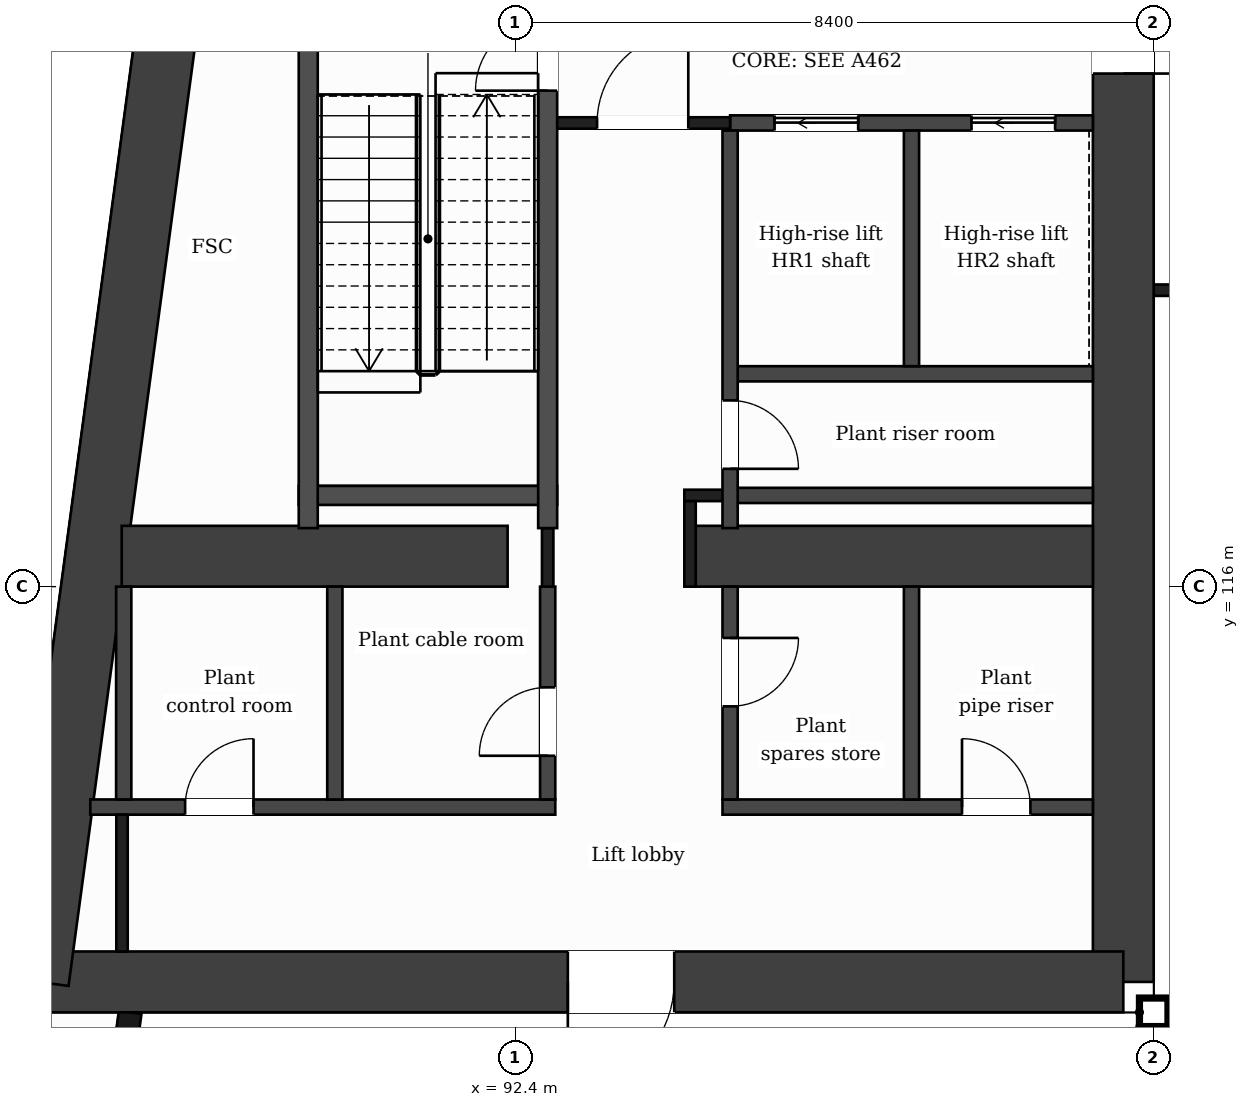
"""IFC4 building model, lengths in metres.
Left out: names, types, materials, properties, quantities, classifications, styles, units other than length and angle.
Written with IfcOpenShell. Run it as: python <this file> out.ifc"""

import sys

from ifc_helpers import new_model, si_unit, direction, frame, frame_2d, origin, place, context, subcontext, project, spatial, rectangle, extrude, element, fill, save


model = new_model("IFC4")
c1 = context("Model", 3, precision=1e-05, world=origin(), true_north=direction((0.0, 1.0)))
c2 = subcontext(c1, "Body", "Model", "MODEL_VIEW")
j1 = project(units=[si_unit("LENGTHUNIT", "METRE"), si_unit("PLANEANGLEUNIT", "RADIAN")], contexts=[c1])
p1 = place(None, origin())
s1 = spatial("IfcSite", under=j1, at=p1, CompositionType="ELEMENT")
p2 = place(p1, origin())
s2 = spatial("IfcBuilding", under=s1, at=p2, CompositionType="ELEMENT")
p3 = place(p2, frame((0.0, 0.0, 254.0)))
s3 = spatial("IfcBuildingStorey", under=s2, at=p3, CompositionType="ELEMENT", Elevation=254.0)
p4 = place(p3, frame((100.4, 132.0, 0.0), z_axis=(0.0, 0.0, 1.0), x_axis=(0.0, -1.0, 0.0)))
e1 = element("IfcWall", 1, at=p4, inside=s3, PredefinedType="SHEAR", context=c2, shape_type="SweptSolid", body=[
    extrude(rectangle(XDim=21.2, YDim=0.8, at=frame_2d((10.6, 0.0))), origin(), (0.0, 0.0, 1.0), 5.0),
])
p5 = place(p4, frame((2.4, 0.0, 0.0)))
e2 = element("IfcOpeningElement", 2, at=p5, cuts=e1, PredefinedType="OPENING", context=c2, shape_type="SweptSolid", body=[
    extrude(rectangle(XDim=1.2, YDim=2.1, at=frame_2d((0.6, 1.05))), frame((0.0, 0.41, 0.0), z_axis=(0.0, -1.0, 0.0), x_axis=(1.0, 0.0, 0.0)), (0.0, 0.0, 1.0), 0.82),
])
p6 = place(p4, frame((7.85, 0.0, 0.0)))
e3 = element("IfcOpeningElement", 3, at=p6, cuts=e1, PredefinedType="OPENING", context=c2, shape_type="SweptSolid", body=[
    extrude(rectangle(XDim=1.4, YDim=2.1, at=frame_2d((0.7, 1.05))), frame((0.0, 0.41, 0.0), z_axis=(0.0, -1.0, 0.0), x_axis=(1.0, 0.0, 0.0)), (0.0, 0.0, 1.0), 0.82),
])
p7 = place(p3, frame((100.4, 110.8, 0.0), z_axis=(0.0, 0.0, 1.0), x_axis=(-1.0, 0.0, 0.0)))
e4 = element("IfcWall", 4, at=p7, inside=s3, PredefinedType="SHEAR", context=c2, shape_type="SweptSolid", body=[
    extrude(rectangle(XDim=14.273, YDim=0.8, at=frame_2d((7.137, 0.0))), origin(), (0.0, 0.0, 1.0), 5.0),
])
p8 = place(p7, frame((5.908, 0.0, 0.0)))
e5 = element("IfcOpeningElement", 5, at=p8, cuts=e4, PredefinedType="OPENING", context=c2, shape_type="SweptSolid", body=[
    extrude(rectangle(XDim=1.4, YDim=2.1, at=frame_2d((0.7, 1.05))), frame((0.0, 0.41, 0.0), z_axis=(0.0, -1.0, 0.0), x_axis=(1.0, 0.0, 0.0)), (0.0, 0.0, 1.0), 0.82),
])
p9 = place(p3, frame((86.127, 110.8, 0.0), z_axis=(0.0, 0.0, 1.0), x_axis=(0.133408347329, 0.991061154956, 0.0)))
e6 = element("IfcWall", 6, at=p9, inside=s3, PredefinedType="SHEAR", context=c2, shape_type="SweptSolid", body=[
    extrude(rectangle(XDim=21.391, YDim=0.8, at=frame_2d((10.696, 0.0))), origin(), (0.0, 0.0, 1.0), 5.0),
])
p10 = place(p3, frame((87.223, 116.4, 0.0), z_axis=(0.0, 0.0, 1.0), x_axis=(1.0, 0.0, 0.0)))
e7 = element("IfcWall", 7, at=p10, inside=s3, PredefinedType="SHEAR", context=c2, shape_type="SweptSolid", body=[
    extrude(rectangle(XDim=5.077, YDim=0.8, at=frame_2d((2.539, 0.0))), origin(), (0.0, 0.0, 1.0), 5.0),
])
p11 = place(p3, frame((94.7, 116.4, 0.0), z_axis=(0.0, 0.0, 1.0), x_axis=(1.0, 0.0, 0.0)))
e8 = element("IfcWall", 8, at=p11, inside=s3, PredefinedType="SHEAR", context=c2, shape_type="SweptSolid", body=[
    extrude(rectangle(XDim=5.3, YDim=0.8, at=frame_2d((2.65, 0.0))), origin(), (0.0, 0.0, 1.0), 5.0),
])
p12 = place(p3, frame((87.334, 110.4, 0.0), z_axis=(0.0, 0.0, 1.0), x_axis=(-0.133437175554, -0.991057273915, 0.0)))
e9 = element("IfcWall", 9, at=p12, inside=s3, PredefinedType="SOLIDWALL", context=c2, shape_type="SweptSolid", body=[
    extrude(rectangle(XDim=6.781, YDim=0.3, at=frame_2d((3.39, 0.0))), origin(), (0.0, 0.0, 1.0), 4.68),
])
p13 = place(p12, frame((1.418, 0.0, 0.0)))
e10 = element("IfcOpeningElement", 10, at=p13, cuts=e9, PredefinedType="OPENING", context=c2, shape_type="SweptSolid", body=[
    extrude(rectangle(XDim=1.2, YDim=2.4, at=frame_2d((0.6, 1.2))), frame((0.0, 0.16, 0.0), z_axis=(0.0, -1.0, 0.0), x_axis=(1.0, 0.0, 0.0)), (0.0, 0.0, 1.0), 0.32),
])
p14 = place(p3, frame((100.7, 110.4, 0.0), z_axis=(0.0, 0.0, 1.0), x_axis=(1.0, 0.0, 0.0)))
e11 = element("IfcWall", 11, at=p14, inside=s3, PredefinedType="PARTITIONING", context=c2, shape_type="SweptSolid", body=[
    extrude(rectangle(XDim=25.4, YDim=0.2, at=frame_2d((12.7, 0.0))), origin(), (0.0, 0.0, 1.0), 4.68),
])
p15 = place(p14, frame((3.7, 0.0, 0.0)))
e12 = element("IfcOpeningElement", 12, at=p15, cuts=e11, PredefinedType="OPENING", context=c2, shape_type="SweptSolid", body=[
    extrude(rectangle(XDim=1.2, YDim=2.1, at=frame_2d((0.6, 1.05))), frame((0.0, 0.11, 0.0), z_axis=(0.0, -1.0, 0.0), x_axis=(1.0, 0.0, 0.0)), (0.0, 0.0, 1.0), 0.22),
])
p16 = place(p3, frame((86.81, 113.1, 0.0), z_axis=(0.0, 0.0, 1.0), x_axis=(1.0, 0.0, 0.0)))
e13 = element("IfcWall", 13, at=p16, inside=s3, PredefinedType="PARTITIONING", context=c2, shape_type="SweptSolid", body=[
    extrude(rectangle(XDim=6.117, YDim=0.2, at=frame_2d((3.059, 0.0))), origin(), (0.0, 0.0, 1.0), 4.68),
])
p17 = place(p16, frame((1.247, 0.0, 0.0)))
e14 = element("IfcOpeningElement", 14, at=p17, cuts=e13, PredefinedType="OPENING", context=c2, shape_type="SweptSolid", body=[
    extrude(rectangle(XDim=0.9, YDim=2.1, at=frame_2d((0.45, 1.05))), frame((0.0, 0.11, 0.0), z_axis=(0.0, -1.0, 0.0), x_axis=(1.0, 0.0, 0.0)), (0.0, 0.0, 1.0), 0.22),
])
p18 = place(p3, frame((95.127, 113.1, 0.0), z_axis=(0.0, 0.0, 1.0), x_axis=(1.0, 0.0, 0.0)))
e15 = element("IfcWall", 15, at=p18, inside=s3, PredefinedType="PARTITIONING", context=c2, shape_type="SweptSolid", body=[
    extrude(rectangle(XDim=4.873, YDim=0.2, at=frame_2d((2.437, 0.0))), origin(), (0.0, 0.0, 1.0), 4.68),
])
p19 = place(p18, frame((3.151, 0.0, 0.0)))
e16 = element("IfcOpeningElement", 16, at=p19, cuts=e15, PredefinedType="OPENING", context=c2, shape_type="SweptSolid", body=[
    extrude(rectangle(XDim=0.9, YDim=2.1, at=frame_2d((0.45, 1.05))), frame((0.0, 0.11, 0.0), z_axis=(0.0, -1.0, 0.0), x_axis=(1.0, 0.0, 0.0)), (0.0, 0.0, 1.0), 0.22),
])
p20 = place(p3, frame((95.227, 117.2, 0.0), z_axis=(0.0, 0.0, 1.0), x_axis=(1.0, 0.0, 0.0)))
e17 = element("IfcWall", 17, at=p20, inside=s3, PredefinedType="PARTITIONING", context=c2, shape_type="SweptSolid", body=[
    extrude(rectangle(XDim=4.773, YDim=0.2, at=frame_2d((2.386, 0.0))), origin(), (0.0, 0.0, 1.0), 4.68),
])
p21 = place(p3, frame((94.625, 117.2, 0.0), z_axis=(0.0, 0.0, 1.0), x_axis=(1.0, 0.0, 0.0)))
e18 = element("IfcWall", 18, at=p21, inside=s3, PredefinedType="PARTITIONING", context=c2, shape_type="SweptSolid", body=[
    extrude(rectangle(XDim=0.602, YDim=0.15, at=frame_2d((0.301, 0.0))), origin(), (0.0, 0.0, 1.0), 4.68),
])
p22 = place(p3, frame((89.552, 117.2, 0.0), z_axis=(0.0, 0.0, 1.0), x_axis=(1.0, 0.0, 0.0)))
e19 = element("IfcWall", 19, at=p22, inside=s3, PredefinedType="PARTITIONING", context=c2, shape_type="SweptSolid", body=[
    extrude(rectangle(XDim=3.4, YDim=0.25, at=frame_2d((1.7, 0.0))), origin(), (0.0, 0.0, 1.0), 4.68),
])
p23 = place(p3, frame((95.227, 118.8, 0.0), z_axis=(0.0, 0.0, 1.0), x_axis=(1.0, 0.0, 0.0)))
e20 = element("IfcWall", 20, at=p23, inside=s3, PredefinedType="PARTITIONING", context=c2, shape_type="SweptSolid", body=[
    extrude(rectangle(XDim=4.773, YDim=0.2, at=frame_2d((2.386, 0.0))), origin(), (0.0, 0.0, 1.0), 4.68),
])
p24 = place(p3, frame((100.8, 119.9, 0.0), z_axis=(0.0, 0.0, 1.0), x_axis=(1.0, 0.0, 0.0)))
e21 = element("IfcWall", 21, at=p24, inside=s3, PredefinedType="PARTITIONING", context=c2, shape_type="SweptSolid", body=[
    extrude(rectangle(XDim=25.2, YDim=0.15, at=frame_2d((12.6, 0.0))), origin(), (0.0, 0.0, 1.0), 4.68),
])
p25 = place(p24, frame((3.6, 0.0, 0.0)))
e22 = element("IfcOpeningElement", 22, at=p25, cuts=e21, PredefinedType="OPENING", context=c2, shape_type="SweptSolid", body=[
    extrude(rectangle(XDim=1.2, YDim=2.1, at=frame_2d((0.6, 1.05))), frame((0.0, 0.085, 0.0), z_axis=(0.0, -1.0, 0.0), x_axis=(1.0, 0.0, 0.0)), (0.0, 0.0, 1.0), 0.17),
])
p26 = place(p24, frame((12.0, 0.0, 0.0)))
e23 = element("IfcOpeningElement", 23, at=p26, cuts=e21, PredefinedType="OPENING", context=c2, shape_type="SweptSolid", body=[
    extrude(rectangle(XDim=1.2, YDim=2.1, at=frame_2d((0.6, 1.05))), frame((0.0, 0.085, 0.0), z_axis=(0.0, -1.0, 0.0), x_axis=(1.0, 0.0, 0.0)), (0.0, 0.0, 1.0), 0.17),
])
p27 = place(p24, frame((20.4, 0.0, 0.0)))
e24 = element("IfcOpeningElement", 24, at=p27, cuts=e21, PredefinedType="OPENING", context=c2, shape_type="SweptSolid", body=[
    extrude(rectangle(XDim=1.2, YDim=2.1, at=frame_2d((0.6, 1.05))), frame((0.0, 0.085, 0.0), z_axis=(0.0, -1.0, 0.0), x_axis=(1.0, 0.0, 0.0)), (0.0, 0.0, 1.0), 0.17),
])
p28 = place(p3, frame((95.227, 122.1, 0.0), z_axis=(0.0, 0.0, 1.0), x_axis=(1.0, 0.0, 0.0)))
e25 = element("IfcWall", 25, at=p28, inside=s3, PredefinedType="PARTITIONING", context=c2, shape_type="SweptSolid", body=[
    extrude(rectangle(XDim=4.773, YDim=0.2, at=frame_2d((2.386, 0.0))), origin(), (0.0, 0.0, 1.0), 4.68),
])
p29 = place(p28, frame((0.585, 0.0, 0.0)))
e26 = element("IfcOpeningElement", 26, at=p29, cuts=e25, PredefinedType="OPENING", context=c2, shape_type="SweptSolid", body=[
    extrude(rectangle(XDim=1.1, YDim=2.1, at=frame_2d((0.55, 1.05))), frame((0.0, 0.11, 0.0), z_axis=(0.0, -1.0, 0.0), x_axis=(1.0, 0.0, 0.0)), (0.0, 0.0, 1.0), 0.22),
])
p30 = place(p28, frame((3.176, 0.0, 0.0)))
e27 = element("IfcOpeningElement", 27, at=p30, cuts=e25, PredefinedType="OPENING", context=c2, shape_type="SweptSolid", body=[
    extrude(rectangle(XDim=1.1, YDim=2.1, at=frame_2d((0.55, 1.05))), frame((0.0, 0.11, 0.0), z_axis=(0.0, -1.0, 0.0), x_axis=(1.0, 0.0, 0.0)), (0.0, 0.0, 1.0), 0.22),
])
p31 = place(p3, frame((92.827, 122.1, 0.0), z_axis=(0.0, 0.0, 1.0), x_axis=(1.0, 0.0, 0.0)))
e28 = element("IfcWall", 28, at=p31, inside=s3, PredefinedType="PARTITIONING", context=c2, shape_type="SweptSolid", body=[
    extrude(rectangle(XDim=2.4, YDim=0.15, at=frame_2d((1.2, 0.0))), origin(), (0.0, 0.0, 1.0), 4.68),
])
p32 = place(p31, frame((0.65, 0.0, 0.0)))
e29 = element("IfcOpeningElement", 29, at=p32, cuts=e28, PredefinedType="OPENING", context=c2, shape_type="SweptSolid", body=[
    extrude(rectangle(XDim=1.2, YDim=2.1, at=frame_2d((0.6, 1.05))), frame((0.0, 0.085, 0.0), z_axis=(0.0, -1.0, 0.0), x_axis=(1.0, 0.0, 0.0)), (0.0, 0.0, 1.0), 0.17),
])
p33 = place(p3, frame((87.25, 113.2, 0.0), z_axis=(0.0, 0.0, 1.0), x_axis=(0.0, 1.0, 0.0)))
e30 = element("IfcWall", 30, at=p33, inside=s3, PredefinedType="PARTITIONING", context=c2, shape_type="SweptSolid", body=[
    extrude(rectangle(XDim=2.8, YDim=0.2, at=frame_2d((1.4, 0.0))), origin(), (0.0, 0.0, 1.0), 4.68),
])
p34 = place(p3, frame((87.227, 111.2, 0.0), z_axis=(0.0, 0.0, 1.0), x_axis=(0.0, 1.0, 0.0)))
e31 = element("IfcWall", 31, at=p34, inside=s3, PredefinedType="PARTITIONING", context=c2, shape_type="SweptSolid", body=[
    extrude(rectangle(XDim=1.8, YDim=0.15, at=frame_2d((0.9, 0.0))), origin(), (0.0, 0.0, 1.0), 4.68),
])
p35 = place(p3, frame((89.677, 116.77, 0.0), z_axis=(0.0, 0.0, 1.0), x_axis=(0.0, 1.0, 0.0)))
e32 = element("IfcWall", 32, at=p35, inside=s3, PredefinedType="PARTITIONING", context=c2, shape_type="SweptSolid", body=[
    extrude(rectangle(XDim=7.055, YDim=0.25, at=frame_2d((3.527, 0.0))), origin(), (0.0, 0.0, 1.0), 4.68),
])
p36 = place(p3, frame((90.027, 113.2, 0.0), z_axis=(0.0, 0.0, 1.0), x_axis=(0.0, 1.0, 0.0)))
e33 = element("IfcWall", 33, at=p36, inside=s3, PredefinedType="PARTITIONING", context=c2, shape_type="SweptSolid", body=[
    extrude(rectangle(XDim=2.8, YDim=0.2, at=frame_2d((1.4, 0.0))), origin(), (0.0, 0.0, 1.0), 4.68),
])
p37 = place(p3, frame((92.827, 113.2, 0.0), z_axis=(0.0, 0.0, 1.0), x_axis=(0.0, 1.0, 0.0)))
e34 = element("IfcWall", 34, at=p37, inside=s3, PredefinedType="PARTITIONING", context=c2, shape_type="SweptSolid", body=[
    extrude(rectangle(XDim=2.8, YDim=0.2, at=frame_2d((1.4, 0.0))), origin(), (0.0, 0.0, 1.0), 4.68),
])
p38 = place(p37, frame((0.575, 0.0, 0.0)))
e35 = element("IfcOpeningElement", 35, at=p38, cuts=e34, PredefinedType="OPENING", context=c2, shape_type="SweptSolid", body=[
    extrude(rectangle(XDim=0.9, YDim=2.1, at=frame_2d((0.45, 1.05))), frame((0.0, 0.11, 0.0), z_axis=(0.0, -1.0, 0.0), x_axis=(1.0, 0.0, 0.0)), (0.0, 0.0, 1.0), 0.22),
])
p39 = place(p3, frame((92.827, 116.0, 0.0), z_axis=(0.0, 0.0, 1.0), x_axis=(0.0, 1.0, 0.0)))
e36 = element("IfcWall", 36, at=p39, inside=s3, PredefinedType="PARTITIONING", context=c2, shape_type="SweptSolid", body=[
    extrude(rectangle(XDim=0.77, YDim=0.15, at=frame_2d((0.385, 0.0))), origin(), (0.0, 0.0, 1.0), 4.68),
])
p40 = place(p3, frame((92.827, 116.77, 0.0), z_axis=(0.0, 0.0, 1.0), x_axis=(0.0, 1.0, 0.0)))
e37 = element("IfcWall", 37, at=p40, inside=s3, PredefinedType="PARTITIONING", context=c2, shape_type="SweptSolid", body=[
    extrude(rectangle(XDim=7.055, YDim=0.25, at=frame_2d((3.527, 0.0))), origin(), (0.0, 0.0, 1.0), 4.68),
])
p41 = place(p40, frame((5.755, 0.0, 0.0)))
e38 = element("IfcOpeningElement", 38, at=p41, cuts=e37, PredefinedType="OPENING", context=c2, shape_type="SweptSolid", body=[
    extrude(rectangle(XDim=0.95, YDim=2.1, at=frame_2d((0.475, 1.05))), frame((0.0, 0.135, 0.0), z_axis=(0.0, -1.0, 0.0), x_axis=(1.0, 0.0, 0.0)), (0.0, 0.0, 1.0), 0.27),
])
p42 = place(p3, frame((94.7, 116.0, 0.0), z_axis=(0.0, 0.0, 1.0), x_axis=(0.0, 1.0, 0.0)))
e39 = element("IfcWall", 39, at=p42, inside=s3, PredefinedType="PARTITIONING", context=c2, shape_type="SweptSolid", body=[
    extrude(rectangle(XDim=1.125, YDim=0.15, at=frame_2d((0.562, 0.0))), origin(), (0.0, 0.0, 1.0), 4.68),
])
p43 = place(p3, frame((95.227, 113.2, 0.0), z_axis=(0.0, 0.0, 1.0), x_axis=(0.0, 1.0, 0.0)))
e40 = element("IfcWall", 40, at=p43, inside=s3, PredefinedType="PARTITIONING", context=c2, shape_type="SweptSolid", body=[
    extrude(rectangle(XDim=2.8, YDim=0.2, at=frame_2d((1.4, 0.0))), origin(), (0.0, 0.0, 1.0), 4.68),
])
p44 = place(p43, frame((1.225, 0.0, 0.0)))
e41 = element("IfcOpeningElement", 41, at=p44, cuts=e40, PredefinedType="OPENING", context=c2, shape_type="SweptSolid", body=[
    extrude(rectangle(XDim=0.9, YDim=2.1, at=frame_2d((0.45, 1.05))), frame((0.0, 0.11, 0.0), z_axis=(0.0, -1.0, 0.0), x_axis=(1.0, 0.0, 0.0)), (0.0, 0.0, 1.0), 0.22),
])
p45 = place(p3, frame((95.227, 116.77, 0.0), z_axis=(0.0, 0.0, 1.0), x_axis=(0.0, 1.0, 0.0)))
e42 = element("IfcWall", 42, at=p45, inside=s3, PredefinedType="PARTITIONING", context=c2, shape_type="SweptSolid", body=[
    extrude(rectangle(XDim=5.23, YDim=0.2, at=frame_2d((2.615, 0.0))), origin(), (0.0, 0.0, 1.0), 4.68),
])
p46 = place(p45, frame((0.78, 0.0, 0.0)))
e43 = element("IfcOpeningElement", 43, at=p46, cuts=e42, PredefinedType="OPENING", context=c2, shape_type="SweptSolid", body=[
    extrude(rectangle(XDim=0.9, YDim=2.1, at=frame_2d((0.45, 1.05))), frame((0.0, 0.11, 0.0), z_axis=(0.0, -1.0, 0.0), x_axis=(1.0, 0.0, 0.0)), (0.0, 0.0, 1.0), 0.22),
])
p47 = place(p3, frame((97.614, 113.2, 0.0), z_axis=(0.0, 0.0, 1.0), x_axis=(0.0, 1.0, 0.0)))
e44 = element("IfcWall", 44, at=p47, inside=s3, PredefinedType="PARTITIONING", context=c2, shape_type="SweptSolid", body=[
    extrude(rectangle(XDim=2.8, YDim=0.2, at=frame_2d((1.4, 0.0))), origin(), (0.0, 0.0, 1.0), 4.68),
])
p48 = place(p3, frame((97.614, 118.9, 0.0), z_axis=(0.0, 0.0, 1.0), x_axis=(0.0, 1.0, 0.0)))
e45 = element("IfcWall", 45, at=p48, inside=s3, PredefinedType="PARTITIONING", context=c2, shape_type="SweptSolid", body=[
    extrude(rectangle(XDim=3.1, YDim=0.2, at=frame_2d((1.55, 0.0))), origin(), (0.0, 0.0, 1.0), 4.68),
])
p49 = place(p3, frame((100.8, 99.79, 0.0), z_axis=(0.0, 0.0, 1.0), x_axis=(0.0, 1.0, 0.0)))
e46 = element("IfcWall", 46, at=p49, inside=s3, PredefinedType="PARTITIONING", context=c2, shape_type="SweptSolid", body=[
    extrude(rectangle(XDim=10.51, YDim=0.2, at=frame_2d((5.255, 0.0))), origin(), (0.0, 0.0, 1.0), 4.68),
])
p50 = place(p32, origin())
e47 = element("IfcDoor", 47, at=p50, inside=s3, OperationType="SINGLE_SWING_RIGHT", PredefinedType="DOOR", context=c2, shape_type="SweptSolid", body=[
    extrude(rectangle(XDim=1.2, YDim=2.1, at=frame_2d((0.6, 1.05))), frame((0.0, 0.025, 0.0), z_axis=(0.0, -1.0, 0.0), x_axis=(1.0, 0.0, 0.0)), (0.0, 0.0, 1.0), 0.05),
])
fill(e29, e47)
p51 = place(p29, origin())
e48 = element("IfcDoor", 48, at=p51, inside=s3, OperationType="SLIDING_TO_LEFT", PredefinedType="DOOR", context=c2, shape_type="SweptSolid", body=[
    extrude(rectangle(XDim=1.1, YDim=2.1, at=frame_2d((0.55, 1.05))), frame((0.0, 0.025, 0.0), z_axis=(0.0, -1.0, 0.0), x_axis=(1.0, 0.0, 0.0)), (0.0, 0.0, 1.0), 0.05),
])
fill(e26, e48)
p52 = place(p30, origin())
e49 = element("IfcDoor", 49, at=p52, inside=s3, OperationType="SLIDING_TO_LEFT", PredefinedType="DOOR", context=c2, shape_type="SweptSolid", body=[
    extrude(rectangle(XDim=1.1, YDim=2.1, at=frame_2d((0.55, 1.05))), frame((0.0, 0.025, 0.0), z_axis=(0.0, -1.0, 0.0), x_axis=(1.0, 0.0, 0.0)), (0.0, 0.0, 1.0), 0.05),
])
fill(e27, e49)
p53 = place(p41, origin())
e50 = element("IfcDoor", 50, at=p53, inside=s3, OperationType="SINGLE_SWING_LEFT", PredefinedType="DOOR", context=c2, shape_type="SweptSolid", body=[
    extrude(rectangle(XDim=0.95, YDim=2.1, at=frame_2d((0.475, 1.05))), frame((0.0, 0.025, 0.0), z_axis=(0.0, -1.0, 0.0), x_axis=(1.0, 0.0, 0.0)), (0.0, 0.0, 1.0), 0.05),
])
fill(e38, e50)
p54 = place(p46, origin())
e51 = element("IfcDoor", 51, at=p54, inside=s3, OperationType="SINGLE_SWING_LEFT", PredefinedType="DOOR", context=c2, shape_type="SweptSolid", body=[
    extrude(rectangle(XDim=0.9, YDim=2.1, at=frame_2d((0.45, 1.05))), frame((0.0, 0.025, 0.0), z_axis=(0.0, -1.0, 0.0), x_axis=(1.0, 0.0, 0.0)), (0.0, 0.0, 1.0), 0.05),
])
fill(e43, e51)
p55 = place(p17, origin())
e52 = element("IfcDoor", 52, at=p55, inside=s3, OperationType="SINGLE_SWING_RIGHT", PredefinedType="DOOR", context=c2, shape_type="SweptSolid", body=[
    extrude(rectangle(XDim=0.9, YDim=2.1, at=frame_2d((0.45, 1.05))), frame((0.0, 0.025, 0.0), z_axis=(0.0, -1.0, 0.0), x_axis=(1.0, 0.0, 0.0)), (0.0, 0.0, 1.0), 0.05),
])
fill(e14, e52)
p56 = place(p38, origin())
e53 = element("IfcDoor", 53, at=p56, inside=s3, OperationType="SINGLE_SWING_LEFT", PredefinedType="DOOR", context=c2, shape_type="SweptSolid", body=[
    extrude(rectangle(XDim=0.9, YDim=2.1, at=frame_2d((0.45, 1.05))), frame((0.0, 0.025, 0.0), z_axis=(0.0, -1.0, 0.0), x_axis=(1.0, 0.0, 0.0)), (0.0, 0.0, 1.0), 0.05),
])
fill(e35, e53)
p57 = place(p44, origin())
e54 = element("IfcDoor", 54, at=p57, inside=s3, OperationType="SINGLE_SWING_RIGHT", PredefinedType="DOOR", context=c2, shape_type="SweptSolid", body=[
    extrude(rectangle(XDim=0.9, YDim=2.1, at=frame_2d((0.45, 1.05))), frame((0.0, 0.025, 0.0), z_axis=(0.0, -1.0, 0.0), x_axis=(1.0, 0.0, 0.0)), (0.0, 0.0, 1.0), 0.05),
])
fill(e41, e54)
p58 = place(p19, origin())
e55 = element("IfcDoor", 55, at=p58, inside=s3, OperationType="SINGLE_SWING_LEFT", PredefinedType="DOOR", context=c2, shape_type="SweptSolid", body=[
    extrude(rectangle(XDim=0.9, YDim=2.1, at=frame_2d((0.45, 1.05))), frame((0.0, 0.025, 0.0), z_axis=(0.0, -1.0, 0.0), x_axis=(1.0, 0.0, 0.0)), (0.0, 0.0, 1.0), 0.05),
])
fill(e16, e55)
p59 = place(p8, origin())
e56 = element("IfcDoor", 56, at=p59, inside=s3, OperationType="SINGLE_SWING_RIGHT", PredefinedType="DOOR", context=c2, shape_type="SweptSolid", body=[
    extrude(rectangle(XDim=1.4, YDim=2.1, at=frame_2d((0.7, 1.05))), frame((0.0, 0.025, 0.0), z_axis=(0.0, -1.0, 0.0), x_axis=(1.0, 0.0, 0.0)), (0.0, 0.0, 1.0), 0.05),
])
fill(e5, e56)
p60 = place(p6, origin())
e57 = element("IfcDoor", 57, at=p60, inside=s3, OperationType="SINGLE_SWING_RIGHT", PredefinedType="DOOR", context=c2, shape_type="SweptSolid", body=[
    extrude(rectangle(XDim=1.4, YDim=2.1, at=frame_2d((0.7, 1.05))), frame((0.0, 0.025, 0.0), z_axis=(0.0, -1.0, 0.0), x_axis=(1.0, 0.0, 0.0)), (0.0, 0.0, 1.0), 0.05),
])
fill(e3, e57)
save(model, sys.argv[1])
